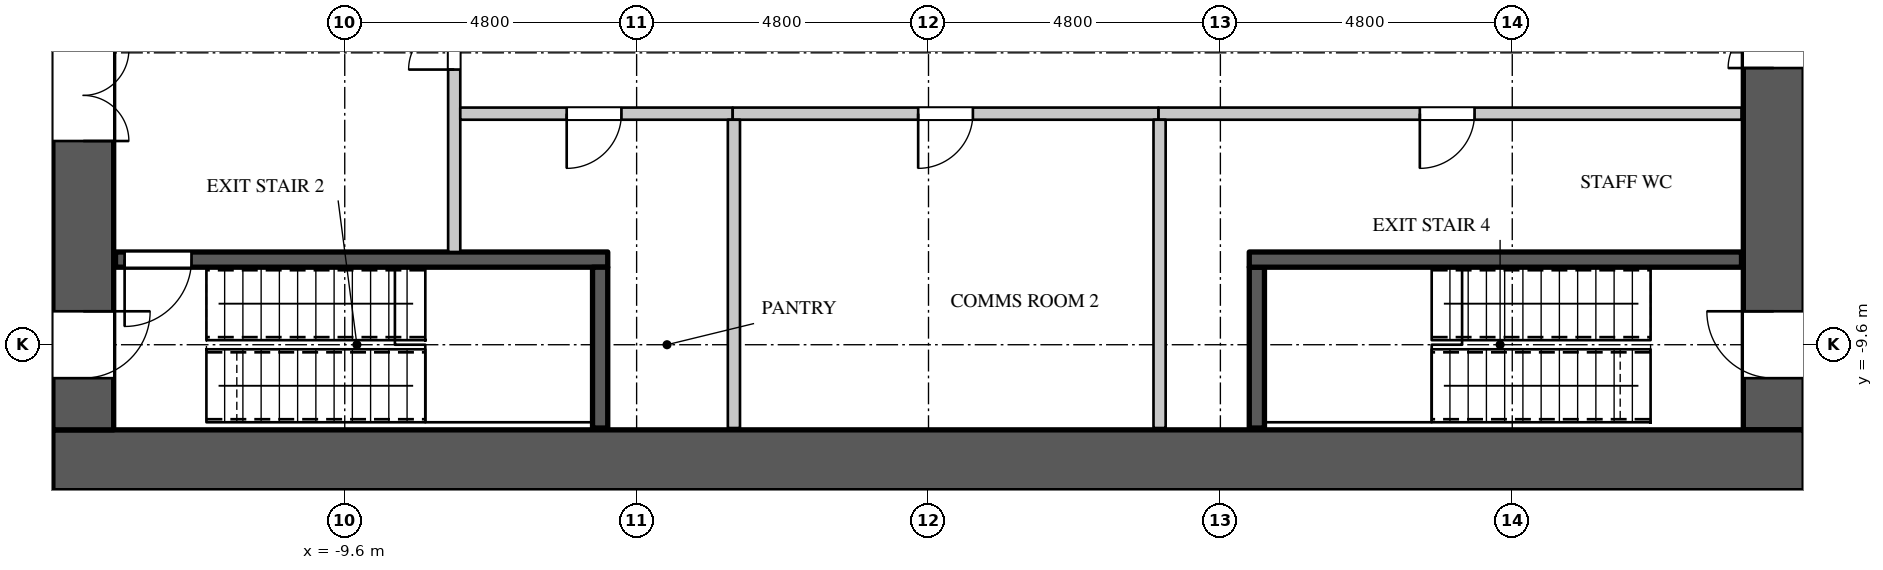
"""IFC4 building model, lengths in metres.
Left out: names, types, materials, properties, quantities, classifications, styles, units other than length and angle.
Written with IfcOpenShell. Run it as: python <this file> out.ifc"""

import sys

from ifc_helpers import new_model, si_unit, direction, frame, frame_2d, origin, place, context, subcontext, project, spatial, rectangle, extrude, element, fill, save


model = new_model("IFC4")
c1 = context("Model", 3, precision=1e-05, world=origin(), true_north=direction((0.0, 1.0)))
c2 = subcontext(c1, "Body", "Model", "MODEL_VIEW")
j1 = project(units=[si_unit("LENGTHUNIT", "METRE"), si_unit("PLANEANGLEUNIT", "RADIAN")], contexts=[c1])
p1 = place(None, origin())
s1 = spatial("IfcSite", under=j1, at=p1, CompositionType="ELEMENT")
p2 = place(p1, origin())
s2 = spatial("IfcBuilding", under=s1, at=p2, CompositionType="ELEMENT")
p3 = place(p2, frame((0.0, 0.0, 71.7)))
s3 = spatial("IfcBuildingStorey", under=s2, at=p3, CompositionType="ELEMENT", Elevation=71.7)
p4 = place(p3, frame((-14.4, -11.5, 0.0), z_axis=(0.0, 0.0, 1.0), x_axis=(1.0, 0.0, 0.0)))
e1 = element("IfcWall", 1, at=p4, inside=s3, PredefinedType="SHEAR", context=c2, shape_type="SweptSolid", body=[
    extrude(rectangle(XDim=28.8, YDim=1.0, at=frame_2d((14.4, 0.0))), origin(), (0.0, 0.0, 1.0), 4.2),
])
p5 = place(p3, frame((13.9, -11.0, 0.0), z_axis=(0.0, 0.0, 1.0), x_axis=(0.0, 1.0, 0.0)))
e2 = element("IfcWall", 2, at=p5, inside=s3, PredefinedType="SHEAR", context=c2, shape_type="SweptSolid", body=[
    extrude(rectangle(XDim=22.0, YDim=1.0, at=frame_2d((11.0, 0.0))), origin(), (0.0, 0.0, 1.0), 4.2),
])
p6 = place(p5, frame((20.05, 0.0, 0.0)))
e3 = element("IfcOpeningElement", 3, at=p6, cuts=e2, PredefinedType="OPENING", context=c2, shape_type="SweptSolid", body=[
    extrude(rectangle(XDim=1.1, YDim=2.2, at=frame_2d((0.55, 1.1))), frame((0.0, 0.51, 0.0), z_axis=(0.0, -1.0, 0.0), x_axis=(1.0, 0.0, 0.0)), (0.0, 0.0, 1.0), 1.02),
])
p7 = place(p5, frame((0.85, 0.0, 0.0)))
e4 = element("IfcOpeningElement", 4, at=p7, cuts=e2, PredefinedType="OPENING", context=c2, shape_type="SweptSolid", body=[
    extrude(rectangle(XDim=1.1, YDim=2.2, at=frame_2d((0.55, 1.1))), frame((0.0, 0.51, 0.0), z_axis=(0.0, -1.0, 0.0), x_axis=(1.0, 0.0, 0.0)), (0.0, 0.0, 1.0), 1.02),
])
p8 = place(p5, frame((14.55, 0.0, 0.0)))
e5 = element("IfcOpeningElement", 5, at=p8, cuts=e2, PredefinedType="OPENING", context=c2, shape_type="SweptSolid", body=[
    extrude(rectangle(XDim=1.5, YDim=2.4, at=frame_2d((0.75, 1.2))), frame((0.0, 0.51, 0.0), z_axis=(0.0, -1.0, 0.0), x_axis=(1.0, 0.0, 0.0)), (0.0, 0.0, 1.0), 1.02),
])
p9 = place(p5, frame((5.95, 0.0, 0.0)))
e6 = element("IfcOpeningElement", 6, at=p9, cuts=e2, PredefinedType="OPENING", context=c2, shape_type="SweptSolid", body=[
    extrude(rectangle(XDim=1.5, YDim=2.4, at=frame_2d((0.75, 1.2))), frame((0.0, 0.51, 0.0), z_axis=(0.0, -1.0, 0.0), x_axis=(1.0, 0.0, 0.0)), (0.0, 0.0, 1.0), 1.02),
])
p10 = place(p3, frame((-13.9, -11.0, 0.0), z_axis=(0.0, 0.0, 1.0), x_axis=(0.0, 1.0, 0.0)))
e7 = element("IfcWall", 7, at=p10, inside=s3, PredefinedType="SHEAR", context=c2, shape_type="SweptSolid", body=[
    extrude(rectangle(XDim=22.0, YDim=1.0, at=frame_2d((11.0, 0.0))), origin(), (0.0, 0.0, 1.0), 4.2),
])
p11 = place(p10, frame((20.05, 0.0, 0.0)))
e8 = element("IfcOpeningElement", 8, at=p11, cuts=e7, PredefinedType="OPENING", context=c2, shape_type="SweptSolid", body=[
    extrude(rectangle(XDim=1.1, YDim=2.2, at=frame_2d((0.55, 1.1))), frame((0.0, 0.51, 0.0), z_axis=(0.0, -1.0, 0.0), x_axis=(1.0, 0.0, 0.0)), (0.0, 0.0, 1.0), 1.02),
])
p12 = place(p10, frame((0.85, 0.0, 0.0)))
e9 = element("IfcOpeningElement", 9, at=p12, cuts=e7, PredefinedType="OPENING", context=c2, shape_type="SweptSolid", body=[
    extrude(rectangle(XDim=1.1, YDim=2.2, at=frame_2d((0.55, 1.1))), frame((0.0, 0.51, 0.0), z_axis=(0.0, -1.0, 0.0), x_axis=(1.0, 0.0, 0.0)), (0.0, 0.0, 1.0), 1.02),
])
p13 = place(p10, frame((15.75, 0.0, 0.0)))
e10 = element("IfcOpeningElement", 10, at=p13, cuts=e7, PredefinedType="OPENING", context=c2, shape_type="SweptSolid", body=[
    extrude(rectangle(XDim=1.5, YDim=2.4, at=frame_2d((0.75, 1.2))), frame((0.0, 0.51, 0.0), z_axis=(0.0, -1.0, 0.0), x_axis=(1.0, 0.0, 0.0)), (0.0, 0.0, 1.0), 1.02),
])
p14 = place(p10, frame((4.75, 0.0, 0.0)))
e11 = element("IfcOpeningElement", 11, at=p14, cuts=e7, PredefinedType="OPENING", context=c2, shape_type="SweptSolid", body=[
    extrude(rectangle(XDim=1.5, YDim=2.4, at=frame_2d((0.75, 1.2))), frame((0.0, 0.51, 0.0), z_axis=(0.0, -1.0, 0.0), x_axis=(1.0, 0.0, 0.0)), (0.0, 0.0, 1.0), 1.02),
])
p15 = place(p3, frame((-7.8, -8.075, 0.0), z_axis=(0.0, 0.0, 1.0), x_axis=(0.0, 1.0, 0.0)))
e12 = element("IfcWall", 12, at=p15, inside=s3, PredefinedType="PARTITIONING", context=c2, shape_type="SweptSolid", body=[
    extrude(rectangle(XDim=5.275, YDim=0.2, at=frame_2d((2.637, 0.0))), origin(), (0.0, 0.0, 1.0), 3.95),
])
p16 = place(p15, frame((3.0, 0.0, 0.0)))
e13 = element("IfcOpeningElement", 13, at=p16, cuts=e12, PredefinedType="OPENING", context=c2, shape_type="SweptSolid", body=[
    extrude(rectangle(XDim=1.5, YDim=2.4, at=frame_2d((0.75, 1.2))), frame((0.0, 0.11, 0.0), z_axis=(0.0, -1.0, 0.0), x_axis=(1.0, 0.0, 0.0)), (0.0, 0.0, 1.0), 0.22),
])
p17 = place(p3, frame((-7.7, -5.8, 0.0), z_axis=(0.0, 0.0, 1.0), x_axis=(1.0, 0.0, 0.0)))
e14 = element("IfcWall", 14, at=p17, inside=s3, PredefinedType="PARTITIONING", context=c2, shape_type="SweptSolid", body=[
    extrude(rectangle(XDim=4.48, YDim=0.2, at=frame_2d((2.24, 0.0))), origin(), (0.0, 0.0, 1.0), 3.95),
])
p18 = place(p17, frame((1.75, 0.0, 0.0)))
e15 = element("IfcOpeningElement", 15, at=p18, cuts=e14, PredefinedType="OPENING", context=c2, shape_type="SweptSolid", body=[
    extrude(rectangle(XDim=0.9, YDim=2.2, at=frame_2d((0.45, 1.1))), frame((0.0, 0.11, 0.0), z_axis=(0.0, -1.0, 0.0), x_axis=(1.0, 0.0, 0.0)), (0.0, 0.0, 1.0), 0.22),
])
p19 = place(p3, frame((3.78, -5.8, 0.0), z_axis=(0.0, 0.0, 1.0), x_axis=(1.0, 0.0, 0.0)))
e16 = element("IfcWall", 16, at=p19, inside=s3, PredefinedType="PARTITIONING", context=c2, shape_type="SweptSolid", body=[
    extrude(rectangle(XDim=9.59, YDim=0.2, at=frame_2d((4.795, 0.0))), origin(), (0.0, 0.0, 1.0), 3.95),
])
p20 = place(p19, frame((4.3, 0.0, 0.0)))
e17 = element("IfcOpeningElement", 17, at=p20, cuts=e16, PredefinedType="OPENING", context=c2, shape_type="SweptSolid", body=[
    extrude(rectangle(XDim=0.9, YDim=2.2, at=frame_2d((0.45, 1.1))), frame((0.0, 0.11, 0.0), z_axis=(0.0, -1.0, 0.0), x_axis=(1.0, 0.0, 0.0)), (0.0, 0.0, 1.0), 0.22),
])
p21 = place(p3, frame((-22.747, -11.968, 0.0), z_axis=(0.0, 0.0, 1.0), x_axis=(0.707106781187, -0.707106781187, 0.0)))
e18 = element("IfcWall", 18, at=p21, inside=s3, PredefinedType="PARTITIONING", context=c2, shape_type="SweptSolid", body=[
    extrude(rectangle(XDim=12.613, YDim=0.15, at=frame_2d((6.307, 0.0))), origin(), (0.0, 0.0, 1.0), 3.95),
])
p22 = place(p21, frame((4.45, 0.0, 0.0)))
e19 = element("IfcOpeningElement", 19, at=p22, cuts=e18, PredefinedType="OPENING", context=c2, shape_type="SweptSolid", body=[
    extrude(rectangle(XDim=0.95, YDim=2.2, at=frame_2d((0.475, 1.1))), frame((0.0, 0.085, 0.0), z_axis=(0.0, -1.0, 0.0), x_axis=(1.0, 0.0, 0.0)), (0.0, 0.0, 1.0), 0.17),
])
p23 = place(p21, frame((9.65, 0.0, 0.0)))
e20 = element("IfcOpeningElement", 20, at=p23, cuts=e18, PredefinedType="OPENING", context=c2, shape_type="SweptSolid", body=[
    extrude(rectangle(XDim=0.95, YDim=2.2, at=frame_2d((0.475, 1.1))), frame((0.0, 0.085, 0.0), z_axis=(0.0, -1.0, 0.0), x_axis=(1.0, 0.0, 0.0)), (0.0, 0.0, 1.0), 0.17),
])
p24 = place(p3, frame((-3.22, -5.8, 0.0), z_axis=(0.0, 0.0, 1.0), x_axis=(1.0, 0.0, 0.0)))
e21 = element("IfcWall", 21, at=p24, inside=s3, PredefinedType="PARTITIONING", context=c2, shape_type="SweptSolid", body=[
    extrude(rectangle(XDim=7.0, YDim=0.2, at=frame_2d((3.5, 0.0))), origin(), (0.0, 0.0, 1.0), 3.95),
])
p25 = place(p24, frame((3.05, 0.0, 0.0)))
e22 = element("IfcOpeningElement", 22, at=p25, cuts=e21, PredefinedType="OPENING", context=c2, shape_type="SweptSolid", body=[
    extrude(rectangle(XDim=0.9, YDim=2.2, at=frame_2d((0.45, 1.1))), frame((0.0, 0.11, 0.0), z_axis=(0.0, -1.0, 0.0), x_axis=(1.0, 0.0, 0.0)), (0.0, 0.0, 1.0), 0.22),
])
for number, where, z_axis, x_axis in (
    (23, (-3.2, -10.97, 0.0), (0.0, 0.0, 1.0), (0.0, 1.0, 0.0)),
    (24, (3.8, -10.97, 0.0), (0.0, 0.0, 1.0), (0.0, 1.0, 0.0)),
):
    element("IfcWall", number, at=place(p3, frame(where, z_axis=z_axis, x_axis=x_axis)), inside=s3, PredefinedType="PARTITIONING", context=c2, shape_type="SweptSolid", body=[
        extrude(rectangle(XDim=5.07, YDim=0.2, at=frame_2d((2.535, 0.0))), origin(), (0.0, 0.0, 1.0), 3.95),
    ])
p26 = place(p3, frame((-13.37, -8.2, 0.0), z_axis=(0.0, 0.0, 1.0), x_axis=(1.0, 0.0, 0.0)))
e25 = element("IfcWall", 25, at=p26, inside=s3, PredefinedType="SHEAR", context=c2, shape_type="SweptSolid", body=[
    extrude(rectangle(XDim=8.095, YDim=0.25, at=frame_2d((4.048, 0.0))), origin(), (0.0, 0.0, 1.0), 3.95),
])
p27 = place(p26, frame((0.15, 0.0, 0.0)))
e26 = element("IfcOpeningElement", 26, at=p27, cuts=e25, PredefinedType="OPENING", context=c2, shape_type="SweptSolid", body=[
    extrude(rectangle(XDim=1.1, YDim=2.2, at=frame_2d((0.55, 1.1))), frame((0.0, 0.135, 0.0), z_axis=(0.0, -1.0, 0.0), x_axis=(1.0, 0.0, 0.0)), (0.0, 0.0, 1.0), 0.27),
])
for number, where, z_axis, x_axis in (
    (27, (-5.4, -10.97, 0.0), (0.0, 0.0, 1.0), (0.0, 1.0, 0.0)),
    (28, (5.4, -10.97, 0.0), (0.0, 0.0, 1.0), (0.0, 1.0, 0.0)),
):
    element("IfcWall", number, at=place(p3, frame(where, z_axis=z_axis, x_axis=x_axis)), inside=s3, PredefinedType="SHEAR", context=c2, shape_type="SweptSolid", body=[
        extrude(rectangle(XDim=2.645, YDim=0.25, at=frame_2d((1.323, 0.0))), origin(), (0.0, 0.0, 1.0), 3.95),
    ])
p28 = place(p3, frame((5.275, -8.2, 0.0), z_axis=(0.0, 0.0, 1.0), x_axis=(1.0, 0.0, 0.0)))
e29 = element("IfcWall", 29, at=p28, inside=s3, PredefinedType="SHEAR", context=c2, shape_type="SweptSolid", body=[
    extrude(rectangle(XDim=8.095, YDim=0.25, at=frame_2d((4.048, 0.0))), origin(), (0.0, 0.0, 1.0), 3.95),
])
p29 = place(p18, origin())
e30 = element("IfcDoor", 30, at=p29, inside=s3, OperationType="SINGLE_SWING_RIGHT", PredefinedType="DOOR", context=c2, shape_type="SweptSolid", body=[
    extrude(rectangle(XDim=0.9, YDim=2.2, at=frame_2d((0.45, 1.1))), frame((0.0, 0.025, 0.0), z_axis=(0.0, -1.0, 0.0), x_axis=(1.0, 0.0, 0.0)), (0.0, 0.0, 1.0), 0.05),
])
fill(e15, e30)
p30 = place(p25, origin())
e31 = element("IfcDoor", 31, at=p30, inside=s3, OperationType="SINGLE_SWING_RIGHT", PredefinedType="DOOR", context=c2, shape_type="SweptSolid", body=[
    extrude(rectangle(XDim=0.9, YDim=2.2, at=frame_2d((0.45, 1.1))), frame((0.0, 0.025, 0.0), z_axis=(0.0, -1.0, 0.0), x_axis=(1.0, 0.0, 0.0)), (0.0, 0.0, 1.0), 0.05),
])
fill(e22, e31)
p31 = place(p20, origin())
e32 = element("IfcDoor", 32, at=p31, inside=s3, OperationType="SINGLE_SWING_RIGHT", PredefinedType="DOOR", context=c2, shape_type="SweptSolid", body=[
    extrude(rectangle(XDim=0.9, YDim=2.2, at=frame_2d((0.45, 1.1))), frame((0.0, 0.025, 0.0), z_axis=(0.0, -1.0, 0.0), x_axis=(1.0, 0.0, 0.0)), (0.0, 0.0, 1.0), 0.05),
])
fill(e17, e32)
p32 = place(p27, origin())
e33 = element("IfcDoor", 33, at=p32, inside=s3, OperationType="SINGLE_SWING_RIGHT", PredefinedType="DOOR", context=c2, shape_type="SweptSolid", body=[
    extrude(rectangle(XDim=1.1, YDim=2.2, at=frame_2d((0.55, 1.1))), frame((0.0, 0.025, 0.0), z_axis=(0.0, -1.0, 0.0), x_axis=(1.0, 0.0, 0.0)), (0.0, 0.0, 1.0), 0.05),
])
fill(e26, e33)
p33 = place(p16, origin())
e34 = element("IfcDoor", 34, at=p33, inside=s3, OperationType="DOUBLE_DOOR_SINGLE_SWING", PredefinedType="DOOR", context=c2, shape_type="SweptSolid", body=[
    extrude(rectangle(XDim=1.5, YDim=2.4, at=frame_2d((0.75, 1.2))), frame((0.0, 0.025, 0.0), z_axis=(0.0, -1.0, 0.0), x_axis=(1.0, 0.0, 0.0)), (0.0, 0.0, 1.0), 0.05),
])
fill(e13, e34)
p34 = place(p12, origin())
e35 = element("IfcDoor", 35, at=p34, inside=s3, OperationType="SINGLE_SWING_LEFT", PredefinedType="DOOR", context=c2, shape_type="SweptSolid", body=[
    extrude(rectangle(XDim=1.1, YDim=2.2, at=frame_2d((0.55, 1.1))), frame((0.0, -0.445, 0.0), z_axis=(0.0, -1.0, 0.0), x_axis=(1.0, 0.0, 0.0)), (0.0, 0.0, 1.0), 0.05),
])
fill(e9, e35)
p35 = place(p7, origin())
e36 = element("IfcDoor", 36, at=p35, inside=s3, OperationType="SINGLE_SWING_RIGHT", PredefinedType="DOOR", context=c2, shape_type="SweptSolid", body=[
    extrude(rectangle(XDim=1.1, YDim=2.2, at=frame_2d((0.55, 1.1))), frame((0.0, 0.495, 0.0), z_axis=(0.0, -1.0, 0.0), x_axis=(1.0, 0.0, 0.0)), (0.0, 0.0, 1.0), 0.05),
])
fill(e4, e36)
p36 = place(p14, origin())
e37 = element("IfcDoor", 37, at=p36, inside=s3, OperationType="DOUBLE_DOOR_SINGLE_SWING", PredefinedType="DOOR", context=c2, shape_type="SweptSolid", body=[
    extrude(rectangle(XDim=1.5, YDim=2.4, at=frame_2d((0.75, 1.2))), frame((0.0, -0.445, 0.0), z_axis=(0.0, -1.0, 0.0), x_axis=(1.0, 0.0, 0.0)), (0.0, 0.0, 1.0), 0.05),
])
fill(e11, e37)
p37 = place(p9, origin())
e38 = element("IfcDoor", 38, at=p37, inside=s3, OperationType="DOUBLE_DOOR_SINGLE_SWING", PredefinedType="DOOR", context=c2, shape_type="SweptSolid", body=[
    extrude(rectangle(XDim=1.5, YDim=2.4, at=frame_2d((0.75, 1.2))), frame((0.0, 0.495, 0.0), z_axis=(0.0, -1.0, 0.0), x_axis=(1.0, 0.0, 0.0)), (0.0, 0.0, 1.0), 0.05),
])
fill(e6, e38)
save(model, sys.argv[1])
